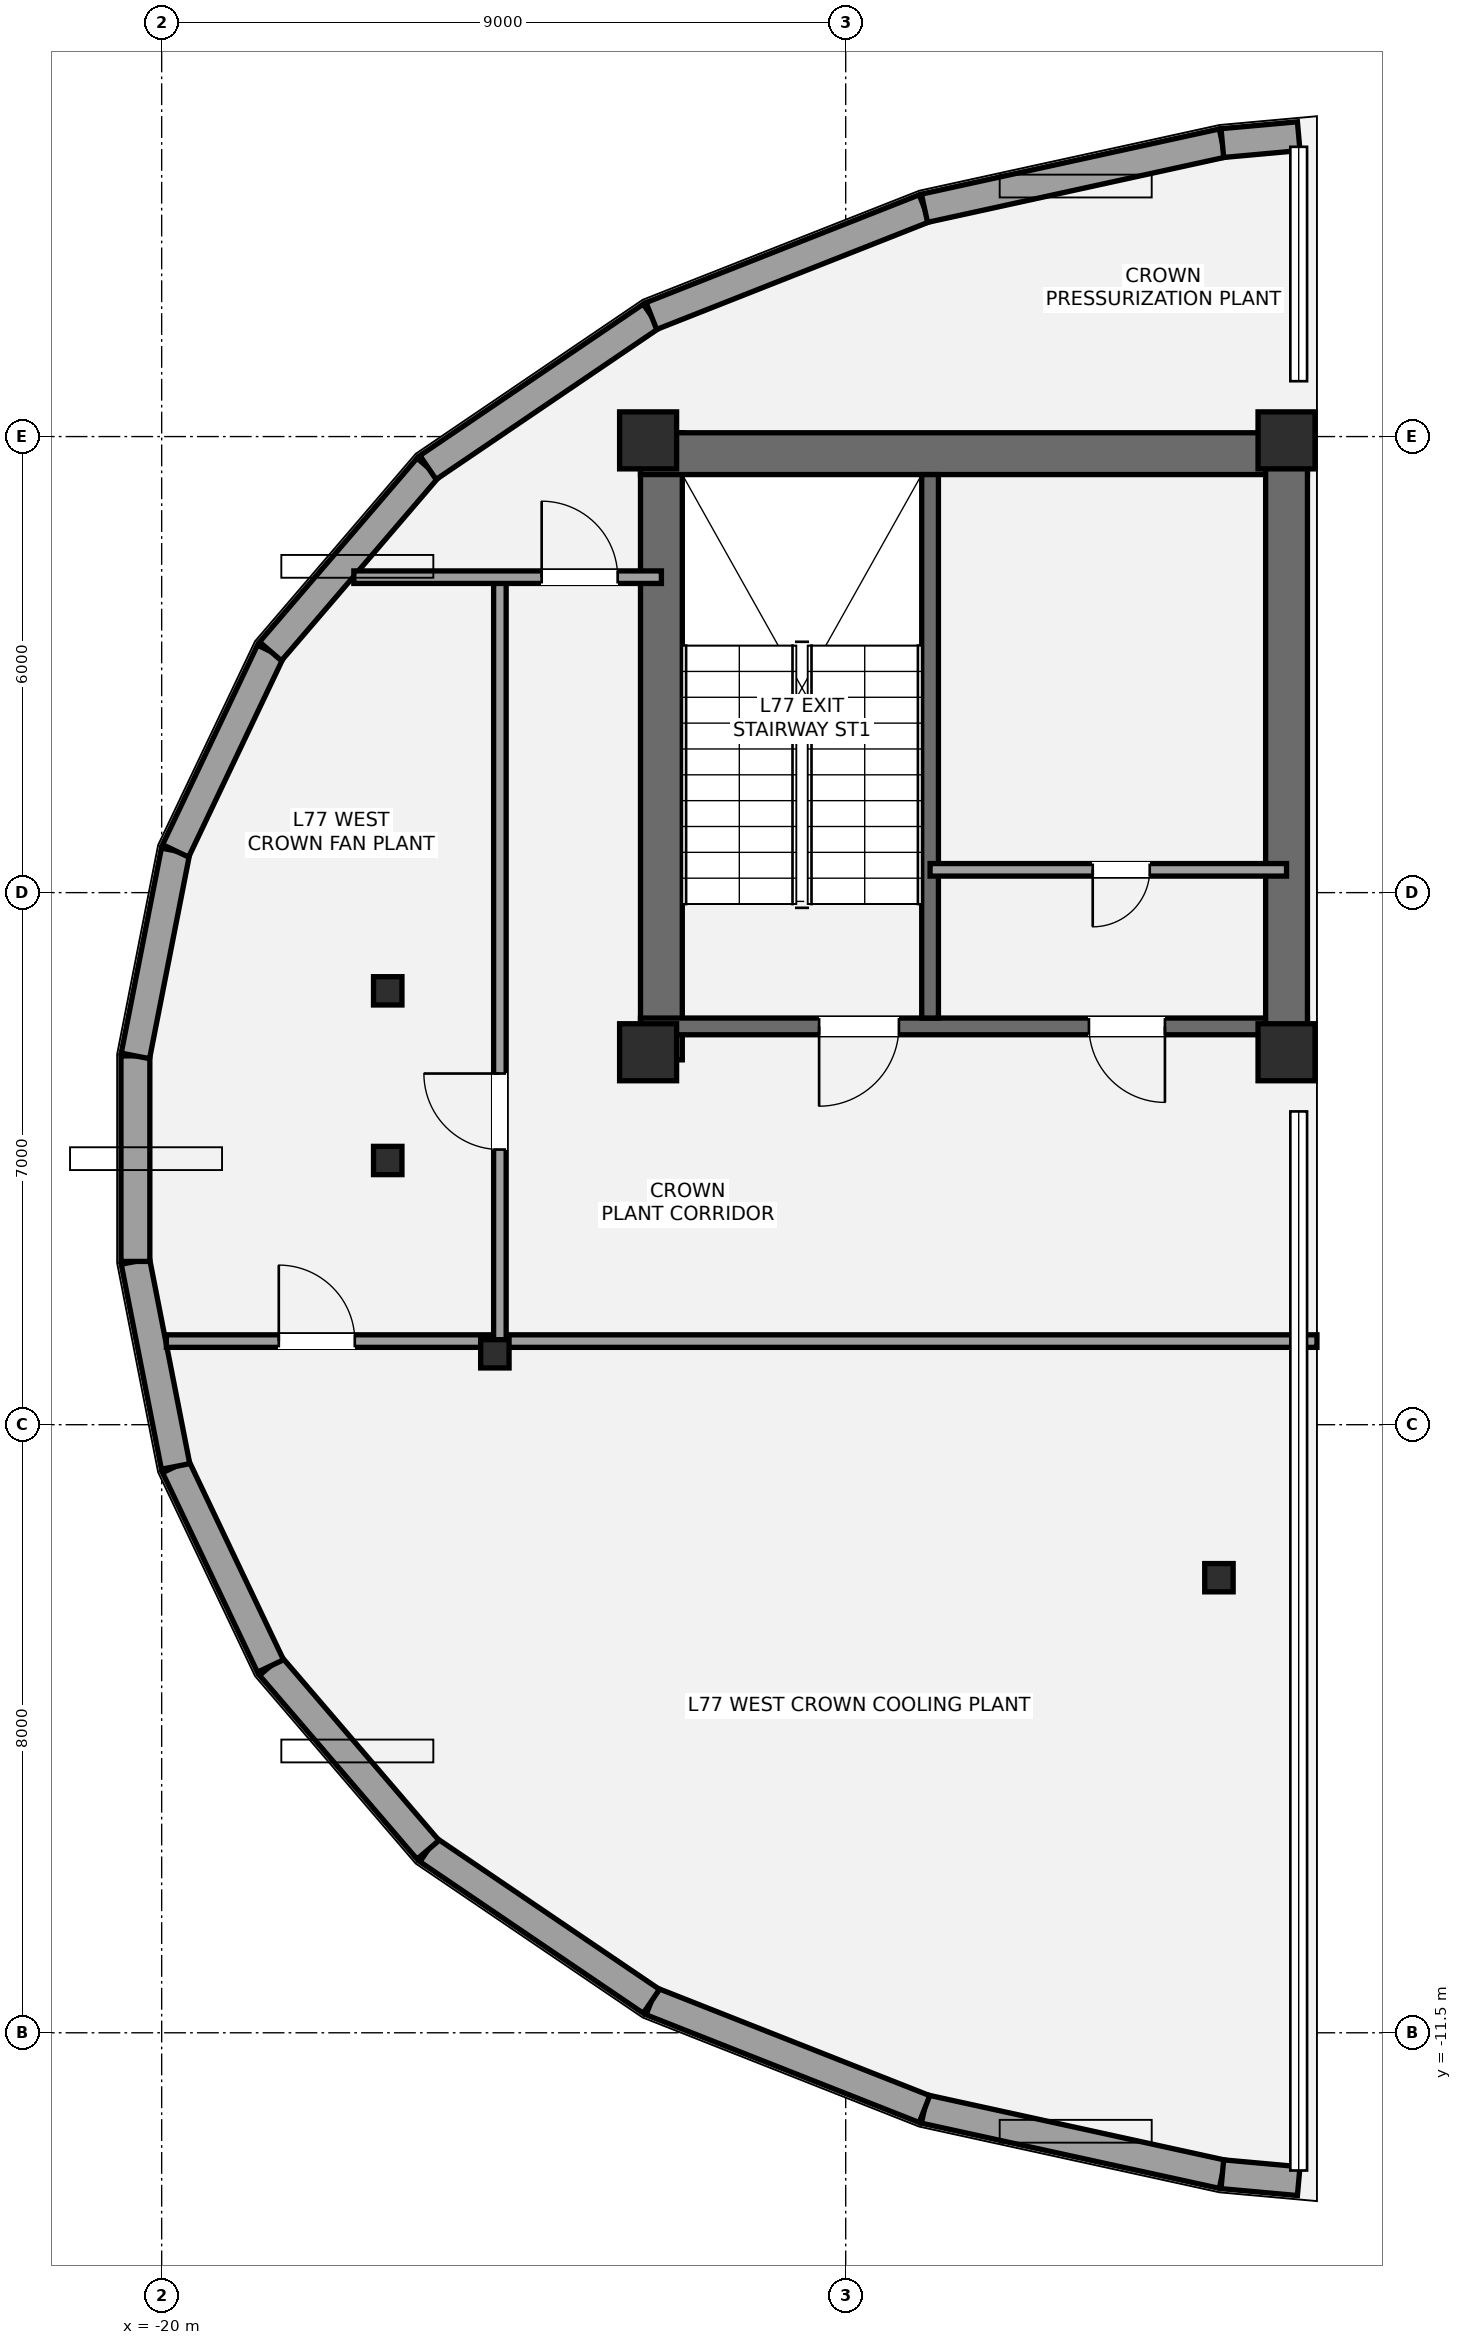
"""IFC4 building model, lengths in metres.
Left out: names, types, materials, properties, quantities, classifications, styles, units other than length and angle.
Written with IfcOpenShell. Run it as: python <this file> out.ifc"""

import sys

from ifc_helpers import new_model, si_unit, direction, frame, frame_2d, origin, origin_2d, place, context, subcontext, project, spatial, rectangle, i_section, extrude, element, fill, save


model = new_model("IFC4")
c1 = context("Model", 3, precision=1e-05, world=origin(), true_north=direction((0.0, 1.0)))
c2 = subcontext(c1, "Body", "Model", "MODEL_VIEW")
j1 = project(units=[si_unit("LENGTHUNIT", "METRE"), si_unit("PLANEANGLEUNIT", "RADIAN")], contexts=[c1])
p1 = place(None, origin())
s1 = spatial("IfcSite", under=j1, at=p1, CompositionType="ELEMENT")
p2 = place(p1, origin())
s2 = spatial("IfcBuilding", under=s1, at=p2, CompositionType="ELEMENT")
p3 = place(p2, frame((0.0, 0.0, 273.0)))
s3 = spatial("IfcBuildingStorey", under=s2, at=p3, CompositionType="ELEMENT", Elevation=273.0)
p4 = place(p3, frame((-13.425, 1.3, 0.0), z_axis=(0.0, 0.0, 1.0), x_axis=(0.0, 1.0, 0.0)))
e1 = element("IfcWall", 1, at=p4, inside=s3, PredefinedType="SHEAR", context=c2, shape_type="SweptSolid", body=[
    extrude(rectangle(XDim=8.25, YDim=0.55, at=frame_2d((4.125, 0.0))), origin(), (0.0, 0.0, 1.0), 3.8),
])
p5 = place(p3, frame((-13.7, 9.275, 0.0), z_axis=(0.0, 0.0, 1.0), x_axis=(1.0, 0.0, 0.0)))
e2 = element("IfcWall", 2, at=p5, inside=s3, PredefinedType="SHEAR", context=c2, shape_type="SweptSolid", body=[
    extrude(rectangle(XDim=8.775, YDim=0.55, at=frame_2d((4.387, 0.0))), origin(), (0.0, 0.0, 1.0), 3.8),
])
p6 = place(p3, frame((-4.925, 1.74, 0.0), z_axis=(0.0, 0.0, 1.0), x_axis=(-1.0, 0.0, 0.0)))
e3 = element("IfcWall", 3, at=p6, inside=s3, PredefinedType="SHEAR", context=c2, shape_type="SweptSolid", body=[
    extrude(rectangle(XDim=8.775, YDim=0.22, at=frame_2d((4.387, 0.0))), origin(), (0.0, 0.0, 1.0), 3.8),
])
p7 = place(p6, frame((5.375, 0.0, 0.0)))
e4 = element("IfcOpeningElement", 4, at=p7, cuts=e3, PredefinedType="OPENING", context=c2, shape_type="SweptSolid", body=[
    extrude(rectangle(XDim=1.05, YDim=2.15, at=frame_2d((0.525, 1.075))), frame((0.0, 0.12, 0.0), z_axis=(0.0, -1.0, 0.0), x_axis=(1.0, 0.0, 0.0)), (0.0, 0.0, 1.0), 0.24),
])
p8 = place(p6, frame((1.875, 0.0, 0.0)))
e5 = element("IfcOpeningElement", 5, at=p8, cuts=e3, PredefinedType="OPENING", context=c2, shape_type="SweptSolid", body=[
    extrude(rectangle(XDim=1.0, YDim=2.15, at=frame_2d((0.5, 1.075))), frame((0.0, 0.12, 0.0), z_axis=(0.0, -1.0, 0.0), x_axis=(1.0, 0.0, 0.0)), (0.0, 0.0, 1.0), 0.24),
])
p9 = place(p3, frame((-5.2, 1.3, 0.0), z_axis=(0.0, 0.0, 1.0), x_axis=(0.0, 1.0, 0.0)))
e6 = element("IfcWall", 6, at=p9, inside=s3, PredefinedType="SHEAR", context=c2, shape_type="SweptSolid", body=[
    extrude(rectangle(XDim=8.25, YDim=0.55, at=frame_2d((4.125, 0.0))), origin(), (0.0, 0.0, 1.0), 3.8),
])
p10 = place(p3, frame((-9.89, 1.85, 0.0), z_axis=(0.0, 0.0, 1.0), x_axis=(0.0, 1.0, 0.0)))
e7 = element("IfcWall", 7, at=p10, inside=s3, PredefinedType="SHEAR", context=c2, shape_type="SweptSolid", body=[
    extrude(rectangle(XDim=7.15, YDim=0.22, at=frame_2d((3.575, 0.0))), origin(), (0.0, 0.0, 1.0), 3.8),
])
for number, where, z_axis, x_axis in (
    (8, (-13.6, 1.4, 0.0), (0.0, 0.0, 1.0), (1.0, 0.0, 0.0)),
    (9, (-13.6, 9.45, 0.0), (0.0, 0.0, 1.0), (1.0, 0.0, 0.0)),
    (10, (-5.2, 1.4, 0.0), (0.0, 0.0, 1.0), (1.0, 0.0, 0.0)),
    (11, (-5.2, 9.45, 0.0), (0.0, 0.0, 1.0), (1.0, 0.0, 0.0)),
):
    element("IfcColumn", number, at=place(p3, frame(where, z_axis=z_axis, x_axis=x_axis)), inside=s3, PredefinedType="PILASTER", context=c2, shape_type="SweptSolid", body=[
        extrude(rectangle(XDim=0.75, YDim=0.75, at=origin_2d()), origin(), (0.0, 0.0, 1.0), 3.8),
    ])
for number, where, z_axis, x_axis in (
    (12, (-17.026, 2.208, 0.0), (0.0, 0.0, 1.0), (1.0, 0.0, 0.0)),
    (13, (-17.026, -0.024, 0.0), (0.0, 0.0, 1.0), (1.0, 0.0, 0.0)),
    (14, (-15.616, -2.567, 0.0), (0.0, 0.0, 1.0), (1.0, 0.0, 0.0)),
    (15, (-6.09, -5.513, 0.0), (0.0, 0.0, 1.0), (1.0, 0.0, 0.0)),
):
    element("IfcColumn", number, at=place(p3, frame(where, z_axis=z_axis, x_axis=x_axis)), inside=s3, PredefinedType="COLUMN", context=c2, shape_type="SweptSolid", body=[
        extrude(i_section(OverallWidth=0.374, OverallDepth=0.372, WebThickness=0.016, FlangeThickness=0.026, at=origin_2d()), origin(), (0.0, 0.0, 1.0), 3.8),
    ])
p11 = place(p3, frame((-9.963, -12.504, 0.0), z_axis=(0.0, 0.0, 1.0), x_axis=(0.97689207626, -0.213733177911, 0.0)))
e16 = element("IfcWall", 16, at=p11, inside=s3, PredefinedType="ELEMENTEDWALL", context=c2, shape_type="SweptSolid", body=[
    extrude(rectangle(XDim=4.012, YDim=0.38, at=frame_2d((2.006, 0.0))), origin(), (0.0, 0.0, 1.0), 2.97),
])
p12 = place(p3, frame((-13.557, -11.086, 0.0), z_axis=(0.0, 0.0, 1.0), x_axis=(0.930231308044, -0.366973723221, 0.0)))
e17 = element("IfcWall", 17, at=p12, inside=s3, PredefinedType="ELEMENTEDWALL", context=c2, shape_type="SweptSolid", body=[
    extrude(rectangle(XDim=3.863, YDim=0.38, at=frame_2d((1.932, 0.0))), origin(), (0.0, 0.0, 1.0), 2.97),
])
p13 = place(p3, frame((-16.496, -9.093, 0.0), z_axis=(0.0, 0.0, 1.0), x_axis=(0.827548787006, -0.561393805741, 0.0)))
e18 = element("IfcWall", 18, at=p13, inside=s3, PredefinedType="ELEMENTEDWALL", context=c2, shape_type="SweptSolid", body=[
    extrude(rectangle(XDim=3.551, YDim=0.38, at=frame_2d((1.775, 0.0))), origin(), (0.0, 0.0, 1.0), 2.97),
])
p14 = place(p3, frame((-18.569, -6.675, 0.0), z_axis=(0.0, 0.0, 1.0), x_axis=(0.650835558852, -0.759218726938, 0.0)))
e19 = element("IfcWall", 19, at=p14, inside=s3, PredefinedType="ELEMENTEDWALL", context=c2, shape_type="SweptSolid", body=[
    extrude(rectangle(XDim=3.185, YDim=0.38, at=frame_2d((1.593, 0.0))), origin(), (0.0, 0.0, 1.0), 2.97),
])
p15 = place(p3, frame((-19.817, -4.049, 0.0), z_axis=(0.0, 0.0, 1.0), x_axis=(0.429421676457, -0.903104104624, 0.0)))
e20 = element("IfcWall", 20, at=p15, inside=s3, PredefinedType="ELEMENTEDWALL", context=c2, shape_type="SweptSolid", body=[
    extrude(rectangle(XDim=2.907, YDim=0.38, at=frame_2d((1.454, 0.0))), origin(), (0.0, 0.0, 1.0), 2.97),
])
p16 = place(p3, frame((-20.346, -1.352, 0.0), z_axis=(0.0, 0.0, 1.0), x_axis=(0.192390980569, -0.981318353337, 0.0)))
e21 = element("IfcWall", 21, at=p16, inside=s3, PredefinedType="ELEMENTEDWALL", context=c2, shape_type="SweptSolid", body=[
    extrude(rectangle(XDim=2.749, YDim=0.38, at=frame_2d((1.374, 0.0))), origin(), (0.0, 0.0, 1.0), 2.97),
])
p17 = place(p3, frame((-20.346, 1.352, 0.0), z_axis=(0.0, 0.0, 1.0), x_axis=(0.0, -1.0, 0.0)))
e22 = element("IfcWall", 22, at=p17, inside=s3, PredefinedType="ELEMENTEDWALL", context=c2, shape_type="SweptSolid", body=[
    extrude(rectangle(XDim=2.704, YDim=0.38, at=frame_2d((1.352, 0.0))), origin(), (0.0, 0.0, 1.0), 2.97),
])
p18 = place(p3, frame((-19.817, 4.049, 0.0), z_axis=(0.0, 0.0, 1.0), x_axis=(-0.192390980569, -0.981318353337, 0.0)))
e23 = element("IfcWall", 23, at=p18, inside=s3, PredefinedType="ELEMENTEDWALL", context=c2, shape_type="SweptSolid", body=[
    extrude(rectangle(XDim=2.749, YDim=0.38, at=frame_2d((1.374, 0.0))), origin(), (0.0, 0.0, 1.0), 2.97),
])
p19 = place(p3, frame((-18.569, 6.675, 0.0), z_axis=(0.0, 0.0, 1.0), x_axis=(-0.429421676457, -0.903104104624, 0.0)))
e24 = element("IfcWall", 24, at=p19, inside=s3, PredefinedType="ELEMENTEDWALL", context=c2, shape_type="SweptSolid", body=[
    extrude(rectangle(XDim=2.907, YDim=0.38, at=frame_2d((1.454, 0.0))), origin(), (0.0, 0.0, 1.0), 2.97),
])
p20 = place(p3, frame((-16.496, 9.093, 0.0), z_axis=(0.0, 0.0, 1.0), x_axis=(-0.650835558852, -0.759218726938, 0.0)))
e25 = element("IfcWall", 25, at=p20, inside=s3, PredefinedType="ELEMENTEDWALL", context=c2, shape_type="SweptSolid", body=[
    extrude(rectangle(XDim=3.185, YDim=0.38, at=frame_2d((1.593, 0.0))), origin(), (0.0, 0.0, 1.0), 2.97),
])
p21 = place(p3, frame((-13.557, 11.086, 0.0), z_axis=(0.0, 0.0, 1.0), x_axis=(-0.827548787006, -0.561393805741, 0.0)))
e26 = element("IfcWall", 26, at=p21, inside=s3, PredefinedType="ELEMENTEDWALL", context=c2, shape_type="SweptSolid", body=[
    extrude(rectangle(XDim=3.551, YDim=0.38, at=frame_2d((1.775, 0.0))), origin(), (0.0, 0.0, 1.0), 2.97),
])
p22 = place(p3, frame((-9.963, 12.504, 0.0), z_axis=(0.0, 0.0, 1.0), x_axis=(-0.930231308044, -0.366973723221, 0.0)))
e27 = element("IfcWall", 27, at=p22, inside=s3, PredefinedType="ELEMENTEDWALL", context=c2, shape_type="SweptSolid", body=[
    extrude(rectangle(XDim=3.863, YDim=0.38, at=frame_2d((1.932, 0.0))), origin(), (0.0, 0.0, 1.0), 2.97),
])
p23 = place(p3, frame((-6.044, 13.361, 0.0), z_axis=(0.0, 0.0, 1.0), x_axis=(-0.97689207626, -0.213733177911, 0.0)))
e28 = element("IfcWall", 28, at=p23, inside=s3, PredefinedType="ELEMENTEDWALL", context=c2, shape_type="SweptSolid", body=[
    extrude(rectangle(XDim=4.012, YDim=0.38, at=frame_2d((2.006, 0.0))), origin(), (0.0, 0.0, 1.0), 2.97),
])
for number, where, z_axis, x_axis in (
    (29, (-5.04, 13.452, 0.0), (0.0, 0.0, 1.0), (-0.996, -0.09, 0.0)),
    (30, (-6.044, -13.361, 0.0), (0.0, 0.0, 1.0), (0.996, -0.09, 0.0)),
):
    element("IfcWall", number, at=place(p3, frame(where, z_axis=z_axis, x_axis=x_axis)), inside=s3, PredefinedType="ELEMENTEDWALL", context=c2, shape_type="SweptSolid", body=[
        extrude(rectangle(XDim=1.009, YDim=0.38, at=frame_2d((0.504, 0.0))), origin(), (0.0, 0.0, 1.0), 2.97),
    ])
p24 = place(p3, frame((-5.2, 3.8, 0.0), z_axis=(0.0, 0.0, 1.0), x_axis=(-1.0, 0.0, 0.0)))
e31 = element("IfcWall", 31, at=p24, inside=s3, PredefinedType="PARTITIONING", context=c2, shape_type="SweptSolid", body=[
    extrude(rectangle(XDim=4.69, YDim=0.165, at=frame_2d((2.345, 0.0))), origin(), (0.0, 0.0, 1.0), 3.6),
])
p25 = place(p24, frame((1.8, 0.0, 0.0)))
e32 = element("IfcOpeningElement", 32, at=p25, cuts=e31, PredefinedType="OPENING", context=c2, shape_type="SweptSolid", body=[
    extrude(rectangle(XDim=0.75, YDim=2.1, at=frame_2d((0.375, 1.05))), frame((0.0, 0.093, 0.0), z_axis=(0.0, -1.0, 0.0), x_axis=(1.0, 0.0, 0.0)), (0.0, 0.0, 1.0), 0.185),
])
p26 = place(p3, frame((-19.938, -2.4, 0.0), z_axis=(0.0, 0.0, 1.0), x_axis=(1.0, 0.0, 0.0)))
e33 = element("IfcWall", 33, at=p26, inside=s3, PredefinedType="PARTITIONING", context=c2, shape_type="SweptSolid", body=[
    extrude(rectangle(XDim=15.138, YDim=0.165, at=frame_2d((7.569, 0.0))), origin(), (0.0, 0.0, 1.0), 2.987),
])
p27 = place(p26, frame((1.479, 0.0, 0.0)))
e34 = element("IfcOpeningElement", 34, at=p27, cuts=e33, PredefinedType="OPENING", context=c2, shape_type="SweptSolid", body=[
    extrude(rectangle(XDim=1.0, YDim=2.15, at=frame_2d((0.5, 1.075))), frame((0.0, 0.093, 0.0), z_axis=(0.0, -1.0, 0.0), x_axis=(1.0, 0.0, 0.0)), (0.0, 0.0, 1.0), 0.185),
])
p28 = place(p3, frame((-15.55, -2.4, 0.0), z_axis=(0.0, 0.0, 1.0), x_axis=(0.0, 1.0, 0.0)))
e35 = element("IfcWall", 35, at=p28, inside=s3, PredefinedType="PARTITIONING", context=c2, shape_type="SweptSolid", body=[
    extrude(rectangle(XDim=10.05, YDim=0.165, at=frame_2d((5.025, 0.0))), origin(), (0.0, 0.0, 1.0), 2.987),
])
p29 = place(p28, frame((2.52, 0.0, 0.0)))
e36 = element("IfcOpeningElement", 36, at=p29, cuts=e35, PredefinedType="OPENING", context=c2, shape_type="SweptSolid", body=[
    extrude(rectangle(XDim=1.0, YDim=2.15, at=frame_2d((0.5, 1.075))), frame((0.0, 0.093, 0.0), z_axis=(0.0, -1.0, 0.0), x_axis=(1.0, 0.0, 0.0)), (0.0, 0.0, 1.0), 0.185),
])
p30 = place(p3, frame((-17.472, 7.65, 0.0), z_axis=(0.0, 0.0, 1.0), x_axis=(1.0, 0.0, 0.0)))
e37 = element("IfcWall", 37, at=p30, inside=s3, PredefinedType="PARTITIONING", context=c2, shape_type="SweptSolid", body=[
    extrude(rectangle(XDim=4.047, YDim=0.165, at=frame_2d((2.023, 0.0))), origin(), (0.0, 0.0, 1.0), 2.968),
])
p31 = place(p30, frame((2.471, 0.0, 0.0)))
e38 = element("IfcOpeningElement", 38, at=p31, cuts=e37, PredefinedType="OPENING", context=c2, shape_type="SweptSolid", body=[
    extrude(rectangle(XDim=1.0, YDim=2.15, at=frame_2d((0.5, 1.075))), frame((0.0, 0.093, 0.0), z_axis=(0.0, -1.0, 0.0), x_axis=(1.0, 0.0, 0.0)), (0.0, 0.0, 1.0), 0.185),
])
p32 = place(p7, origin())
e39 = element("IfcDoor", 39, at=p32, inside=s3, OperationType="SINGLE_SWING_RIGHT", PredefinedType="DOOR", context=c2, shape_type="SweptSolid", body=[
    extrude(rectangle(XDim=1.05, YDim=2.15, at=frame_2d((0.525, 1.075))), frame((0.0, 0.025, 0.0), z_axis=(0.0, -1.0, 0.0), x_axis=(1.0, 0.0, 0.0)), (0.0, 0.0, 1.0), 0.05),
])
fill(e4, e39)
p33 = place(p8, origin())
e40 = element("IfcDoor", 40, at=p33, inside=s3, OperationType="SINGLE_SWING_LEFT", PredefinedType="DOOR", context=c2, shape_type="SweptSolid", body=[
    extrude(rectangle(XDim=1.0, YDim=2.15, at=frame_2d((0.5, 1.075))), frame((0.0, 0.025, 0.0), z_axis=(0.0, -1.0, 0.0), x_axis=(1.0, 0.0, 0.0)), (0.0, 0.0, 1.0), 0.05),
])
fill(e5, e40)
p34 = place(p25, origin())
e41 = element("IfcDoor", 41, at=p34, inside=s3, OperationType="SINGLE_SWING_RIGHT", PredefinedType="DOOR", context=c2, shape_type="SweptSolid", body=[
    extrude(rectangle(XDim=0.75, YDim=2.1, at=frame_2d((0.375, 1.05))), frame((0.0, 0.025, 0.0), z_axis=(0.0, -1.0, 0.0), x_axis=(1.0, 0.0, 0.0)), (0.0, 0.0, 1.0), 0.05),
])
fill(e32, e41)
p35 = place(p27, origin())
e42 = element("IfcDoor", 42, at=p35, inside=s3, OperationType="SINGLE_SWING_LEFT", PredefinedType="DOOR", context=c2, shape_type="SweptSolid", body=[
    extrude(rectangle(XDim=1.0, YDim=2.15, at=frame_2d((0.5, 1.075))), frame((0.0, 0.025, 0.0), z_axis=(0.0, -1.0, 0.0), x_axis=(1.0, 0.0, 0.0)), (0.0, 0.0, 1.0), 0.05),
])
fill(e34, e42)
p36 = place(p29, origin())
e43 = element("IfcDoor", 43, at=p36, inside=s3, OperationType="SINGLE_SWING_RIGHT", PredefinedType="DOOR", context=c2, shape_type="SweptSolid", body=[
    extrude(rectangle(XDim=1.0, YDim=2.15, at=frame_2d((0.5, 1.075))), frame((0.0, 0.025, 0.0), z_axis=(0.0, -1.0, 0.0), x_axis=(1.0, 0.0, 0.0)), (0.0, 0.0, 1.0), 0.05),
])
fill(e36, e43)
p37 = place(p31, origin())
e44 = element("IfcDoor", 44, at=p37, inside=s3, OperationType="SINGLE_SWING_LEFT", PredefinedType="DOOR", context=c2, shape_type="SweptSolid", body=[
    extrude(rectangle(XDim=1.0, YDim=2.15, at=frame_2d((0.5, 1.075))), frame((0.0, 0.025, 0.0), z_axis=(0.0, -1.0, 0.0), x_axis=(1.0, 0.0, 0.0)), (0.0, 0.0, 1.0), 0.05),
])
fill(e38, e44)
save(model, sys.argv[1])
